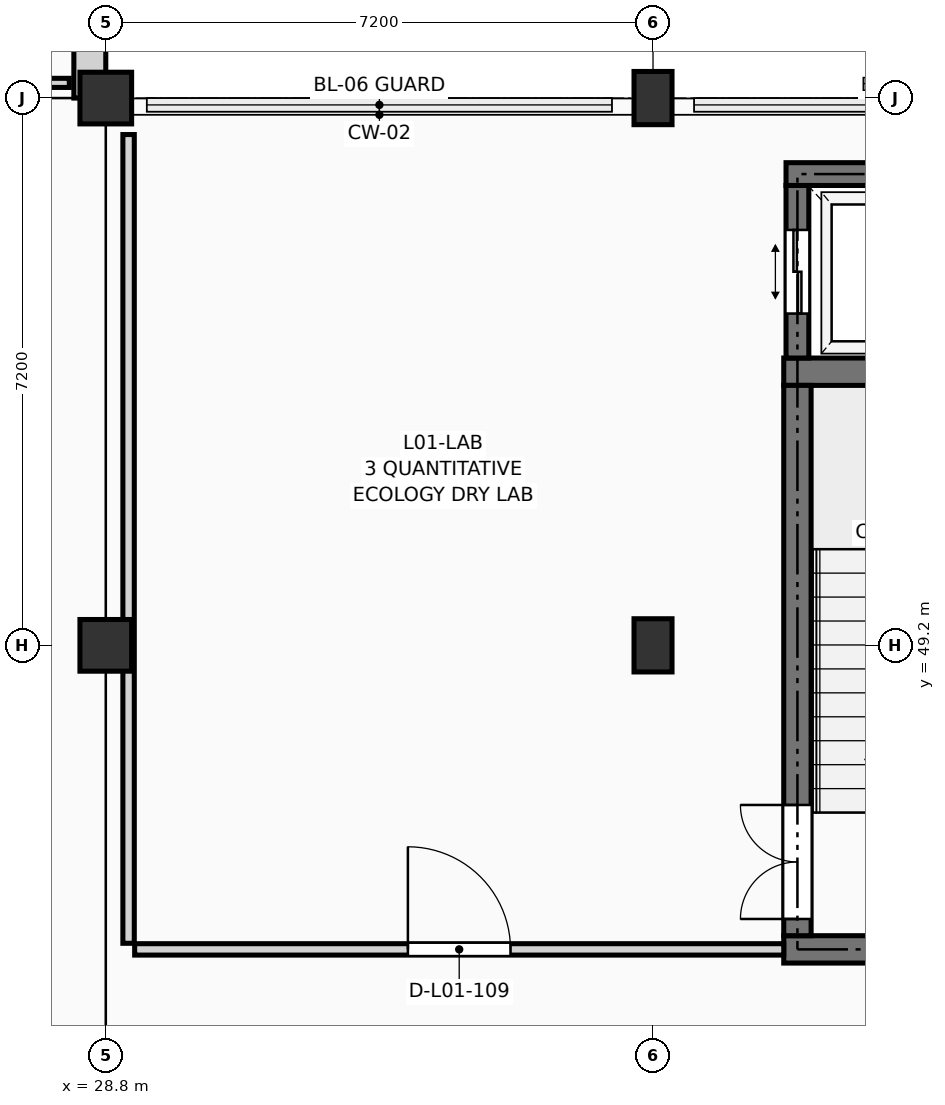
"""IFC4 building model, lengths in metres.
Left out: names, types, materials, properties, quantities, classifications, styles, units other than length and angle.
Written with IfcOpenShell. Run it as: python <this file> out.ifc"""

import sys

from ifc_helpers import new_model, si_unit, direction, frame, frame_2d, origin, origin_2d, place, context, subcontext, project, spatial, rectangle, extrude, element, fill, save


model = new_model("IFC4")
c1 = context("Model", 3, precision=1e-05, world=origin(), true_north=direction((0.0, 1.0)))
c2 = subcontext(c1, "Body", "Model", "MODEL_VIEW")
j1 = project(units=[si_unit("LENGTHUNIT", "METRE"), si_unit("PLANEANGLEUNIT", "RADIAN")], contexts=[c1])
p1 = place(None, origin())
s1 = spatial("IfcSite", under=j1, at=p1, CompositionType="ELEMENT")
p2 = place(p1, origin())
s2 = spatial("IfcBuilding", under=s1, at=p2, CompositionType="ELEMENT")
p3 = place(p2, frame((0.0, 0.0, 4.5)))
s3 = spatial("IfcBuildingStorey", under=s2, at=p3, CompositionType="ELEMENT", Elevation=4.5)
for number, where, z_axis, x_axis in (
    (1, (28.8, 49.2, 0.0), (0.0, 0.0, 1.0), (1.0, 0.0, 0.0)),
    (2, (28.8, 56.4, 0.0), (0.0, 0.0, 1.0), (1.0, 0.0, 0.0)),
):
    element("IfcColumn", number, at=place(p3, frame(where, z_axis=z_axis, x_axis=x_axis)), inside=s3, PredefinedType="COLUMN", context=c2, shape_type="SweptSolid", body=[
        extrude(rectangle(XDim=0.68, YDim=0.68, at=origin_2d()), origin(), (0.0, 0.0, 1.0), 4.05),
    ])
for number, where, z_axis, x_axis in (
    (3, (36.0, 49.2, 0.0), (0.0, 0.0, 1.0), (1.0, 0.0, 0.0)),
    (4, (36.0, 56.4, 0.0), (0.0, 0.0, 1.0), (1.0, 0.0, 0.0)),
):
    element("IfcColumn", number, at=place(p3, frame(where, z_axis=z_axis, x_axis=x_axis)), inside=s3, PredefinedType="COLUMN", context=c2, shape_type="SweptSolid", body=[
        extrude(rectangle(XDim=0.5, YDim=0.7, at=origin_2d()), origin(), (0.0, 0.0, 1.0), 4.05),
    ])
p4 = place(p3, frame((28.59, 56.4, 0.0), z_axis=(0.0, 0.0, 1.0), x_axis=(0.0, 1.0, 0.0)))
e5 = element("IfcWall", 5, at=p4, inside=s3, PredefinedType="SOLIDWALL", context=c2, shape_type="SweptSolid", body=[
    extrude(rectangle(XDim=7.2, YDim=0.42, at=frame_2d((3.6, 0.0))), origin(), (0.0, 0.0, 1.0), 3.16),
])
p5 = place(p4, frame((1.717, 0.0, 0.45)))
e6 = element("IfcOpeningElement", 6, at=p5, cuts=e5, PredefinedType="OPENING", context=c2, shape_type="SweptSolid", body=[
    extrude(rectangle(XDim=1.4, YDim=2.38, at=frame_2d((0.7, 1.19))), frame((0.0, 0.222, 0.0), z_axis=(0.0, -1.0, 0.0), x_axis=(1.0, 0.0, 0.0)), (0.0, 0.0, 1.0), 0.444),
])
p6 = place(p4, frame((4.083, 0.0, 0.45)))
e7 = element("IfcOpeningElement", 7, at=p6, cuts=e5, PredefinedType="OPENING", context=c2, shape_type="SweptSolid", body=[
    extrude(rectangle(XDim=1.4, YDim=2.38, at=frame_2d((0.7, 1.19))), frame((0.0, 0.222, 0.0), z_axis=(0.0, -1.0, 0.0), x_axis=(1.0, 0.0, 0.0)), (0.0, 0.0, 1.0), 0.444),
])
for number, where, z_axis, x_axis in (
    (8, (37.72, 45.2, 0.0), (0.0, 0.0, 1.0), (1.0, 0.0, 0.0)),
    (9, (37.72, 52.8, 0.0), (0.0, 0.0, 1.0), (1.0, 0.0, 0.0)),
):
    element("IfcWall", number, at=place(p3, frame(where, z_axis=z_axis, x_axis=x_axis)), inside=s3, PredefinedType="SHEAR", context=c2, shape_type="SweptSolid", body=[
        extrude(rectangle(XDim=4.48, YDim=0.36, at=frame_2d((2.24, 0.0))), origin(), (0.0, 0.0, 1.0), 3.79),
    ])
p7 = place(p3, frame((37.9, 45.38, 0.0), z_axis=(0.0, 0.0, 1.0), x_axis=(0.0, 1.0, 0.0)))
e10 = element("IfcWall", 10, at=p7, inside=s3, PredefinedType="SHEAR", context=c2, shape_type="SweptSolid", body=[
    extrude(rectangle(XDim=7.24, YDim=0.36, at=frame_2d((3.62, 0.0))), origin(), (0.0, 0.0, 1.0), 3.79),
])
p8 = place(p7, frame((0.22, 0.0, 0.0)))
e11 = element("IfcOpeningElement", 11, at=p8, cuts=e10, PredefinedType="OPENING", context=c2, shape_type="SweptSolid", body=[
    extrude(rectangle(XDim=1.5, YDim=2.2, at=frame_2d((0.75, 1.1))), frame((0.0, 0.192, 0.0), z_axis=(0.0, -1.0, 0.0), x_axis=(1.0, 0.0, 0.0)), (0.0, 0.0, 1.0), 0.384),
])
p9 = place(p3, frame((37.75, 55.4, 0.0), z_axis=(0.0, 0.0, 1.0), x_axis=(1.0, 0.0, 0.0)))
e12 = element("IfcWall", 12, at=p9, inside=s3, PredefinedType="SHEAR", context=c2, shape_type="SweptSolid", body=[
    extrude(rectangle(XDim=2.7, YDim=0.3, at=frame_2d((1.35, 0.0))), origin(), (0.0, 0.0, 1.0), 3.79),
])
p10 = place(p3, frame((37.9, 52.98, 0.0), z_axis=(0.0, 0.0, 1.0), x_axis=(0.0, 1.0, 0.0)))
e13 = element("IfcWall", 13, at=p10, inside=s3, PredefinedType="SHEAR", context=c2, shape_type="SweptSolid", body=[
    extrude(rectangle(XDim=2.27, YDim=0.3, at=frame_2d((1.135, 0.0))), origin(), (0.0, 0.0, 1.0), 3.79),
])
p11 = place(p10, frame((0.585, 0.0, 0.0)))
e14 = element("IfcOpeningElement", 14, at=p11, cuts=e13, PredefinedType="OPENING", context=c2, shape_type="SweptSolid", body=[
    extrude(rectangle(XDim=1.1, YDim=2.2, at=frame_2d((0.55, 1.1))), frame((0.0, 0.162, 0.0), z_axis=(0.0, -1.0, 0.0), x_axis=(1.0, 0.0, 0.0)), (0.0, 0.0, 1.0), 0.324),
])
p12 = place(p3, frame((29.1, 45.28, 0.0), z_axis=(0.0, 0.0, 1.0), x_axis=(0.0, 1.0, 0.0)))
e15 = element("IfcWall", 15, at=p12, inside=s3, PredefinedType="PARTITIONING", context=c2, shape_type="SweptSolid", body=[
    extrude(rectangle(XDim=10.64, YDim=0.15, at=frame_2d((5.32, 0.0))), origin(), (0.0, 0.0, 1.0), 2.925),
])
p13 = place(p3, frame((29.18, 45.2, 0.0), z_axis=(0.0, 0.0, 1.0), x_axis=(1.0, 0.0, 0.0)))
e16 = element("IfcWall", 16, at=p13, inside=s3, PredefinedType="PARTITIONING", context=c2, shape_type="SweptSolid", body=[
    extrude(rectangle(XDim=8.54, YDim=0.15, at=frame_2d((4.27, 0.0))), origin(), (0.0, 0.0, 1.0), 3.775),
])
p14 = place(p13, frame((3.595, 0.0, 0.0)))
e17 = element("IfcOpeningElement", 17, at=p14, cuts=e16, PredefinedType="OPENING", context=c2, shape_type="SweptSolid", body=[
    extrude(rectangle(XDim=1.35, YDim=2.2, at=frame_2d((0.675, 1.1))), frame((0.0, 0.087, 0.0), z_axis=(0.0, -1.0, 0.0), x_axis=(1.0, 0.0, 0.0)), (0.0, 0.0, 1.0), 0.174),
])
p15 = place(p3, frame((16.08, 56.6, 0.0), z_axis=(0.0, 0.0, 1.0), x_axis=(1.0, 0.0, 0.0)))
e18 = element("IfcWall", 18, at=p15, inside=s3, PredefinedType="PARTITIONING", context=c2, shape_type="SweptSolid", body=[
    extrude(rectangle(XDim=12.24, YDim=0.12, at=frame_2d((6.12, 0.0))), origin(), (0.0, 0.0, 1.0), 3.025),
])
p16 = place(p8, origin())
e19 = element("IfcDoor", 19, at=p16, inside=s3, OperationType="DOUBLE_DOOR_SINGLE_SWING", PredefinedType="DOOR", context=c2, shape_type="SweptSolid", body=[
    extrude(rectangle(XDim=1.5, YDim=2.2, at=frame_2d((0.75, 1.1))), frame((0.0, 0.025, 0.0), z_axis=(0.0, -1.0, 0.0), x_axis=(1.0, 0.0, 0.0)), (0.0, 0.0, 1.0), 0.05),
])
fill(e11, e19)
p17 = place(p11, origin())
e20 = element("IfcDoor", 20, at=p17, inside=s3, OperationType="DOUBLE_DOOR_SLIDING", PredefinedType="DOOR", context=c2, shape_type="SweptSolid", body=[
    extrude(rectangle(XDim=1.1, YDim=2.2, at=frame_2d((0.55, 1.1))), frame((0.0, 0.025, 0.0), z_axis=(0.0, -1.0, 0.0), x_axis=(1.0, 0.0, 0.0)), (0.0, 0.0, 1.0), 0.05),
])
fill(e14, e20)
p18 = place(p14, origin())
e21 = element("IfcDoor", 21, at=p18, inside=s3, OperationType="SINGLE_SWING_LEFT", PredefinedType="DOOR", context=c2, shape_type="SweptSolid", body=[
    extrude(rectangle(XDim=1.35, YDim=2.2, at=frame_2d((0.675, 1.1))), frame((0.0, 0.025, 0.0), z_axis=(0.0, -1.0, 0.0), x_axis=(1.0, 0.0, 0.0)), (0.0, 0.0, 1.0), 0.05),
])
fill(e17, e21)
save(model, sys.argv[1])
